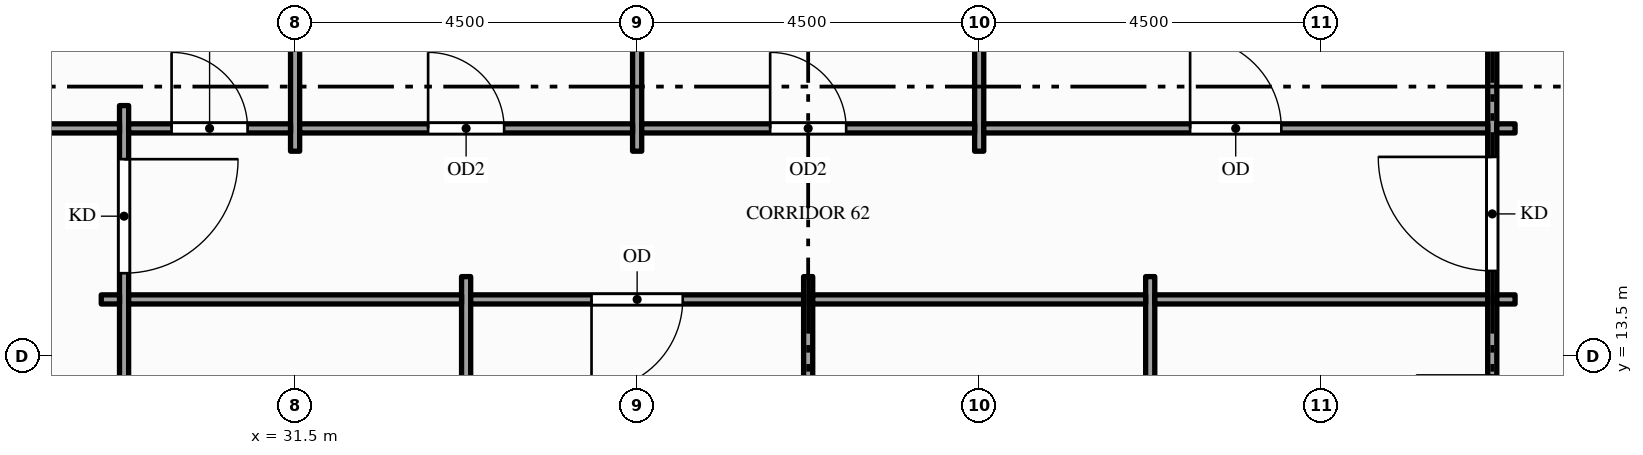
"""IFC4 building model, lengths in metres.
Left out: names, types, materials, properties, quantities, classifications, styles, units other than length and angle.
Written with IfcOpenShell. Run it as: python <this file> out.ifc"""

import sys

from ifc_helpers import new_model, si_unit, direction, frame, frame_2d, origin, place, context, subcontext, project, spatial, rectangle, extrude, element, fill, save


model = new_model("IFC4")
c1 = context("Model", 3, precision=1e-05, world=origin(), true_north=direction((0.0, 1.0)))
c2 = subcontext(c1, "Body", "Model", "MODEL_VIEW")
j1 = project(units=[si_unit("LENGTHUNIT", "METRE"), si_unit("PLANEANGLEUNIT", "RADIAN")], contexts=[c1])
p1 = place(None, origin())
s1 = spatial("IfcSite", under=j1, at=p1, CompositionType="ELEMENT")
p2 = place(p1, origin())
s2 = spatial("IfcBuilding", under=s1, at=p2, CompositionType="ELEMENT")
p3 = place(p2, frame((0.0, 0.0, 227.0)))
s3 = spatial("IfcBuildingStorey", under=s2, at=p3, CompositionType="ELEMENT", Elevation=227.0)
p4 = place(p3, frame((29.25, 2.7, 0.0), z_axis=(0.0, 0.0, 1.0), x_axis=(0.0, 1.0, 0.0)))
e1 = element("IfcWall", 1, at=p4, inside=s3, PredefinedType="PARTITIONING", context=c2, shape_type="SweptSolid", body=[
    extrude(rectangle(XDim=14.1, YDim=0.12, at=frame_2d((7.05, 0.0))), origin(), (0.0, 0.0, 1.0), 2.87),
])
p5 = place(p4, frame((0.705, 0.0, 0.0)))
e2 = element("IfcOpeningElement", 2, at=p5, cuts=e1, PredefinedType="OPENING", context=c2, shape_type="SweptSolid", body=[
    extrude(rectangle(XDim=1.5, YDim=2.1, at=frame_2d((0.75, 1.05))), frame((0.0, 0.07, 0.0), z_axis=(0.0, -1.0, 0.0), x_axis=(1.0, 0.0, 0.0)), (0.0, 0.0, 1.0), 0.14),
])
p6 = place(p4, frame((11.895, 0.0, 0.0)))
e3 = element("IfcOpeningElement", 3, at=p6, cuts=e1, PredefinedType="OPENING", context=c2, shape_type="SweptSolid", body=[
    extrude(rectangle(XDim=1.5, YDim=2.1, at=frame_2d((0.75, 1.05))), frame((0.0, 0.07, 0.0), z_axis=(0.0, -1.0, 0.0), x_axis=(1.0, 0.0, 0.0)), (0.0, 0.0, 1.0), 0.14),
])
p7 = place(p3, frame((31.5, 16.2, 0.0), z_axis=(0.0, 0.0, 1.0), x_axis=(0.0, 1.0, 0.0)))
e4 = element("IfcWall", 4, at=p7, inside=s3, PredefinedType="PARTITIONING", context=c2, shape_type="SweptSolid", body=[
    extrude(rectangle(XDim=4.65, YDim=0.12, at=frame_2d((2.325, 0.0))), origin(), (0.0, 0.0, 1.0), 2.87),
])
p8 = place(p3, frame((33.75, 4.95, 0.0), z_axis=(0.0, 0.0, 1.0), x_axis=(0.0, 1.0, 0.0)))
e5 = element("IfcWall", 5, at=p8, inside=s3, PredefinedType="PARTITIONING", context=c2, shape_type="SweptSolid", body=[
    extrude(rectangle(XDim=9.6, YDim=0.12, at=frame_2d((4.8, 0.0))), origin(), (0.0, 0.0, 1.0), 2.87),
])
p9 = place(p3, frame((36.0, 16.2, 0.0), z_axis=(0.0, 0.0, 1.0), x_axis=(0.0, 1.0, 0.0)))
e6 = element("IfcWall", 6, at=p9, inside=s3, PredefinedType="PARTITIONING", context=c2, shape_type="SweptSolid", body=[
    extrude(rectangle(XDim=4.65, YDim=0.12, at=frame_2d((2.325, 0.0))), origin(), (0.0, 0.0, 1.0), 2.87),
])
p10 = place(p3, frame((38.25, 4.95, 0.0), z_axis=(0.0, 0.0, 1.0), x_axis=(0.0, 1.0, 0.0)))
e7 = element("IfcWall", 7, at=p10, inside=s3, PredefinedType="PARTITIONING", context=c2, shape_type="SweptSolid", body=[
    extrude(rectangle(XDim=9.6, YDim=0.12, at=frame_2d((4.8, 0.0))), origin(), (0.0, 0.0, 1.0), 2.87),
])
p11 = place(p3, frame((40.5, 16.2, 0.0), z_axis=(0.0, 0.0, 1.0), x_axis=(0.0, 1.0, 0.0)))
e8 = element("IfcWall", 8, at=p11, inside=s3, PredefinedType="PARTITIONING", context=c2, shape_type="SweptSolid", body=[
    extrude(rectangle(XDim=4.65, YDim=0.12, at=frame_2d((2.325, 0.0))), origin(), (0.0, 0.0, 1.0), 2.87),
])
p12 = place(p3, frame((42.75, 4.95, 0.0), z_axis=(0.0, 0.0, 1.0), x_axis=(0.0, 1.0, 0.0)))
e9 = element("IfcWall", 9, at=p12, inside=s3, PredefinedType="PARTITIONING", context=c2, shape_type="SweptSolid", body=[
    extrude(rectangle(XDim=9.6, YDim=0.12, at=frame_2d((4.8, 0.0))), origin(), (0.0, 0.0, 1.0), 2.87),
])
p13 = place(p3, frame((47.25, -1.35, 0.0), z_axis=(0.0, 0.0, 1.0), x_axis=(0.0, 1.0, 0.0)))
e10 = element("IfcWall", 10, at=p13, inside=s3, PredefinedType="PARTITIONING", context=c2, shape_type="SweptSolid", body=[
    extrude(rectangle(XDim=22.2, YDim=0.12, at=frame_2d((11.1, 0.0))), origin(), (0.0, 0.0, 1.0), 2.87),
])
p14 = place(p13, frame((4.725, 0.0, 0.0)))
e11 = element("IfcOpeningElement", 11, at=p14, cuts=e10, PredefinedType="OPENING", context=c2, shape_type="SweptSolid", body=[
    extrude(rectangle(XDim=1.5, YDim=2.1, at=frame_2d((0.75, 1.05))), frame((0.0, 0.07, 0.0), z_axis=(0.0, -1.0, 0.0), x_axis=(1.0, 0.0, 0.0)), (0.0, 0.0, 1.0), 0.14),
])
p15 = place(p13, frame((15.975, 0.0, 0.0)))
e12 = element("IfcOpeningElement", 12, at=p15, cuts=e10, PredefinedType="OPENING", context=c2, shape_type="SweptSolid", body=[
    extrude(rectangle(XDim=1.5, YDim=2.1, at=frame_2d((0.75, 1.05))), frame((0.0, 0.07, 0.0), z_axis=(0.0, -1.0, 0.0), x_axis=(1.0, 0.0, 0.0)), (0.0, 0.0, 1.0), 0.14),
])
p16 = place(p13, frame((7.6, 0.0, 0.0)))
e13 = element("IfcOpeningElement", 13, at=p16, cuts=e10, PredefinedType="OPENING", context=c2, shape_type="SweptSolid", body=[
    extrude(rectangle(XDim=0.9, YDim=2.1, at=frame_2d((0.45, 1.05))), frame((0.0, 0.07, 0.0), z_axis=(0.0, -1.0, 0.0), x_axis=(1.0, 0.0, 0.0)), (0.0, 0.0, 1.0), 0.14),
])
p17 = place(p13, frame((10.65, 0.0, 0.0)))
e14 = element("IfcOpeningElement", 14, at=p17, cuts=e10, PredefinedType="OPENING", context=c2, shape_type="SweptSolid", body=[
    extrude(rectangle(XDim=0.9, YDim=2.1, at=frame_2d((0.45, 1.05))), frame((0.0, 0.07, 0.0), z_axis=(0.0, -1.0, 0.0), x_axis=(1.0, 0.0, 0.0)), (0.0, 0.0, 1.0), 0.14),
])
p18 = place(p13, frame((13.6, 0.0, 0.0)))
e15 = element("IfcOpeningElement", 15, at=p18, cuts=e10, PredefinedType="OPENING", context=c2, shape_type="SweptSolid", body=[
    extrude(rectangle(XDim=1.0, YDim=2.1, at=frame_2d((0.5, 1.05))), frame((0.0, 0.07, 0.0), z_axis=(0.0, -1.0, 0.0), x_axis=(1.0, 0.0, 0.0)), (0.0, 0.0, 1.0), 0.14),
])
p19 = place(p3, frame((28.95, 14.25, 0.0), z_axis=(0.0, 0.0, 1.0), x_axis=(1.0, 0.0, 0.0)))
e16 = element("IfcWall", 16, at=p19, inside=s3, PredefinedType="PARTITIONING", context=c2, shape_type="SweptSolid", body=[
    extrude(rectangle(XDim=0.24, YDim=0.12, at=frame_2d((0.12, 0.0))), origin(), (0.0, 0.0, 1.0), 2.87),
])
p20 = place(p3, frame((29.31, 14.25, 0.0), z_axis=(0.0, 0.0, 1.0), x_axis=(1.0, 0.0, 0.0)))
e17 = element("IfcWall", 17, at=p20, inside=s3, PredefinedType="PARTITIONING", context=c2, shape_type="SweptSolid", body=[
    extrude(rectangle(XDim=4.38, YDim=0.12, at=frame_2d((2.19, 0.0))), origin(), (0.0, 0.0, 1.0), 2.87),
])
p21 = place(p3, frame((33.81, 14.25, 0.0), z_axis=(0.0, 0.0, 1.0), x_axis=(1.0, 0.0, 0.0)))
e18 = element("IfcWall", 18, at=p21, inside=s3, PredefinedType="PARTITIONING", context=c2, shape_type="SweptSolid", body=[
    extrude(rectangle(XDim=4.38, YDim=0.12, at=frame_2d((2.19, 0.0))), origin(), (0.0, 0.0, 1.0), 2.87),
])
p22 = place(p21, frame((1.59, 0.0, 0.0)))
e19 = element("IfcOpeningElement", 19, at=p22, cuts=e18, PredefinedType="OPENING", context=c2, shape_type="SweptSolid", body=[
    extrude(rectangle(XDim=1.2, YDim=2.1, at=frame_2d((0.6, 1.05))), frame((0.0, 0.07, 0.0), z_axis=(0.0, -1.0, 0.0), x_axis=(1.0, 0.0, 0.0)), (0.0, 0.0, 1.0), 0.14),
])
for number, where, z_axis, x_axis in (
    (20, (38.31, 14.25, 0.0), (0.0, 0.0, 1.0), (1.0, 0.0, 0.0)),
    (21, (42.81, 14.25, 0.0), (0.0, 0.0, 1.0), (1.0, 0.0, 0.0)),
):
    element("IfcWall", number, at=place(p3, frame(where, z_axis=z_axis, x_axis=x_axis)), inside=s3, PredefinedType="PARTITIONING", context=c2, shape_type="SweptSolid", body=[
        extrude(rectangle(XDim=4.38, YDim=0.12, at=frame_2d((2.19, 0.0))), origin(), (0.0, 0.0, 1.0), 2.87),
    ])
p23 = place(p3, frame((47.31, 14.25, 0.0), z_axis=(0.0, 0.0, 1.0), x_axis=(1.0, 0.0, 0.0)))
e22 = element("IfcWall", 22, at=p23, inside=s3, PredefinedType="PARTITIONING", context=c2, shape_type="SweptSolid", body=[
    extrude(rectangle(XDim=0.24, YDim=0.12, at=frame_2d((0.12, 0.0))), origin(), (0.0, 0.0, 1.0), 2.87),
])
p24 = place(p3, frame((27.06, 16.5, 0.0), z_axis=(0.0, 0.0, 1.0), x_axis=(1.0, 0.0, 0.0)))
e23 = element("IfcWall", 23, at=p24, inside=s3, PredefinedType="PARTITIONING", context=c2, shape_type="SweptSolid", body=[
    extrude(rectangle(XDim=2.13, YDim=0.12, at=frame_2d((1.065, 0.0))), origin(), (0.0, 0.0, 1.0), 2.87),
])
p25 = place(p3, frame((29.31, 16.5, 0.0), z_axis=(0.0, 0.0, 1.0), x_axis=(1.0, 0.0, 0.0)))
e24 = element("IfcWall", 24, at=p25, inside=s3, PredefinedType="PARTITIONING", context=c2, shape_type="SweptSolid", body=[
    extrude(rectangle(XDim=2.13, YDim=0.12, at=frame_2d((1.065, 0.0))), origin(), (0.0, 0.0, 1.0), 2.87),
])
p26 = place(p25, frame((0.565, 0.0, 0.0)))
e25 = element("IfcOpeningElement", 25, at=p26, cuts=e24, PredefinedType="OPENING", context=c2, shape_type="SweptSolid", body=[
    extrude(rectangle(XDim=1.0, YDim=2.1, at=frame_2d((0.5, 1.05))), frame((0.0, 0.07, 0.0), z_axis=(0.0, -1.0, 0.0), x_axis=(1.0, 0.0, 0.0)), (0.0, 0.0, 1.0), 0.14),
])
p27 = place(p3, frame((31.56, 16.5, 0.0), z_axis=(0.0, 0.0, 1.0), x_axis=(1.0, 0.0, 0.0)))
e26 = element("IfcWall", 26, at=p27, inside=s3, PredefinedType="PARTITIONING", context=c2, shape_type="SweptSolid", body=[
    extrude(rectangle(XDim=4.38, YDim=0.12, at=frame_2d((2.19, 0.0))), origin(), (0.0, 0.0, 1.0), 2.87),
])
p28 = place(p27, frame((1.69, 0.0, 0.0)))
e27 = element("IfcOpeningElement", 27, at=p28, cuts=e26, PredefinedType="OPENING", context=c2, shape_type="SweptSolid", body=[
    extrude(rectangle(XDim=1.0, YDim=2.1, at=frame_2d((0.5, 1.05))), frame((0.0, 0.07, 0.0), z_axis=(0.0, -1.0, 0.0), x_axis=(1.0, 0.0, 0.0)), (0.0, 0.0, 1.0), 0.14),
])
p29 = place(p3, frame((36.06, 16.5, 0.0), z_axis=(0.0, 0.0, 1.0), x_axis=(1.0, 0.0, 0.0)))
e28 = element("IfcWall", 28, at=p29, inside=s3, PredefinedType="PARTITIONING", context=c2, shape_type="SweptSolid", body=[
    extrude(rectangle(XDim=4.38, YDim=0.12, at=frame_2d((2.19, 0.0))), origin(), (0.0, 0.0, 1.0), 2.87),
])
p30 = place(p29, frame((1.69, 0.0, 0.0)))
e29 = element("IfcOpeningElement", 29, at=p30, cuts=e28, PredefinedType="OPENING", context=c2, shape_type="SweptSolid", body=[
    extrude(rectangle(XDim=1.0, YDim=2.1, at=frame_2d((0.5, 1.05))), frame((0.0, 0.07, 0.0), z_axis=(0.0, -1.0, 0.0), x_axis=(1.0, 0.0, 0.0)), (0.0, 0.0, 1.0), 0.14),
])
p31 = place(p3, frame((40.56, 16.5, 0.0), z_axis=(0.0, 0.0, 1.0), x_axis=(1.0, 0.0, 0.0)))
e30 = element("IfcWall", 30, at=p31, inside=s3, PredefinedType="PARTITIONING", context=c2, shape_type="SweptSolid", body=[
    extrude(rectangle(XDim=6.63, YDim=0.12, at=frame_2d((3.315, 0.0))), origin(), (0.0, 0.0, 1.0), 2.87),
])
p32 = place(p31, frame((2.715, 0.0, 0.0)))
e31 = element("IfcOpeningElement", 31, at=p32, cuts=e30, PredefinedType="OPENING", context=c2, shape_type="SweptSolid", body=[
    extrude(rectangle(XDim=1.2, YDim=2.1, at=frame_2d((0.6, 1.05))), frame((0.0, 0.07, 0.0), z_axis=(0.0, -1.0, 0.0), x_axis=(1.0, 0.0, 0.0)), (0.0, 0.0, 1.0), 0.14),
])
p33 = place(p3, frame((47.31, 16.5, 0.0), z_axis=(0.0, 0.0, 1.0), x_axis=(1.0, 0.0, 0.0)))
e32 = element("IfcWall", 32, at=p33, inside=s3, PredefinedType="PARTITIONING", context=c2, shape_type="SweptSolid", body=[
    extrude(rectangle(XDim=0.24, YDim=0.12, at=frame_2d((0.12, 0.0))), origin(), (0.0, 0.0, 1.0), 2.87),
])
p34 = place(p6, origin())
e33 = element("IfcDoor", 33, at=p34, inside=s3, OperationType="SINGLE_SWING_RIGHT", PredefinedType="DOOR", context=c2, shape_type="SweptSolid", body=[
    extrude(rectangle(XDim=1.5, YDim=2.1, at=frame_2d((0.75, 1.05))), frame((0.0, 0.025, 0.0), z_axis=(0.0, -1.0, 0.0), x_axis=(1.0, 0.0, 0.0)), (0.0, 0.0, 1.0), 0.05),
])
fill(e3, e33)
p35 = place(p15, origin())
e34 = element("IfcDoor", 34, at=p35, inside=s3, OperationType="SINGLE_SWING_RIGHT", PredefinedType="DOOR", context=c2, shape_type="SweptSolid", body=[
    extrude(rectangle(XDim=1.5, YDim=2.1, at=frame_2d((0.75, 1.05))), frame((0.0, 0.025, 0.0), z_axis=(0.0, -1.0, 0.0), x_axis=(1.0, 0.0, 0.0)), (0.0, 0.0, 1.0), 0.05),
])
fill(e12, e34)
p36 = place(p22, origin())
e35 = element("IfcDoor", 35, at=p36, inside=s3, OperationType="SINGLE_SWING_LEFT", PredefinedType="DOOR", context=c2, shape_type="SweptSolid", body=[
    extrude(rectangle(XDim=1.2, YDim=2.1, at=frame_2d((0.6, 1.05))), frame((0.0, 0.025, 0.0), z_axis=(0.0, -1.0, 0.0), x_axis=(1.0, 0.0, 0.0)), (0.0, 0.0, 1.0), 0.05),
])
fill(e19, e35)
p37 = place(p26, origin())
e36 = element("IfcDoor", 36, at=p37, inside=s3, OperationType="SINGLE_SWING_LEFT", PredefinedType="DOOR", context=c2, shape_type="SweptSolid", body=[
    extrude(rectangle(XDim=1.0, YDim=2.1, at=frame_2d((0.5, 1.05))), frame((0.0, 0.025, 0.0), z_axis=(0.0, -1.0, 0.0), x_axis=(1.0, 0.0, 0.0)), (0.0, 0.0, 1.0), 0.05),
])
fill(e25, e36)
p38 = place(p28, origin())
e37 = element("IfcDoor", 37, at=p38, inside=s3, OperationType="SINGLE_SWING_LEFT", PredefinedType="DOOR", context=c2, shape_type="SweptSolid", body=[
    extrude(rectangle(XDim=1.0, YDim=2.1, at=frame_2d((0.5, 1.05))), frame((0.0, 0.025, 0.0), z_axis=(0.0, -1.0, 0.0), x_axis=(1.0, 0.0, 0.0)), (0.0, 0.0, 1.0), 0.05),
])
fill(e27, e37)
p39 = place(p30, origin())
e38 = element("IfcDoor", 38, at=p39, inside=s3, OperationType="SINGLE_SWING_LEFT", PredefinedType="DOOR", context=c2, shape_type="SweptSolid", body=[
    extrude(rectangle(XDim=1.0, YDim=2.1, at=frame_2d((0.5, 1.05))), frame((0.0, 0.025, 0.0), z_axis=(0.0, -1.0, 0.0), x_axis=(1.0, 0.0, 0.0)), (0.0, 0.0, 1.0), 0.05),
])
fill(e29, e38)
p40 = place(p32, origin())
e39 = element("IfcDoor", 39, at=p40, inside=s3, OperationType="SINGLE_SWING_LEFT", PredefinedType="DOOR", context=c2, shape_type="SweptSolid", body=[
    extrude(rectangle(XDim=1.2, YDim=2.1, at=frame_2d((0.6, 1.05))), frame((0.0, 0.025, 0.0), z_axis=(0.0, -1.0, 0.0), x_axis=(1.0, 0.0, 0.0)), (0.0, 0.0, 1.0), 0.05),
])
fill(e31, e39)
save(model, sys.argv[1])
